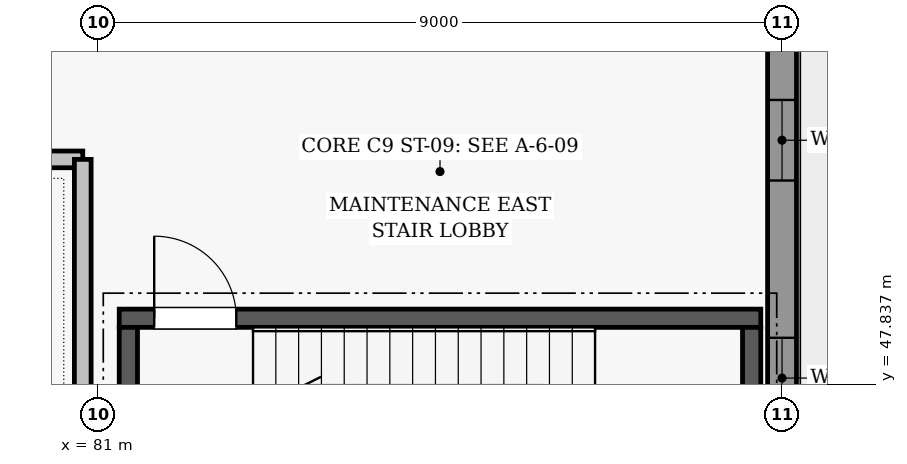
"""IFC4 building model, lengths in metres.
Left out: names, types, materials, properties, quantities, classifications, styles, units other than length and angle.
Written with IfcOpenShell. Run it as: python <this file> out.ifc"""

import sys

from ifc_helpers import new_model, si_unit, direction, frame, frame_2d, origin, place, context, subcontext, project, spatial, rectangle, extrude, element, fill, save


model = new_model("IFC4")
c1 = context("Model", 3, precision=1e-05, world=origin(), true_north=direction((0.0, 1.0)))
c2 = subcontext(c1, "Body", "Model", "MODEL_VIEW")
j1 = project(units=[si_unit("LENGTHUNIT", "METRE"), si_unit("PLANEANGLEUNIT", "RADIAN")], contexts=[c1])
p1 = place(None, origin())
s1 = spatial("IfcSite", under=j1, at=p1, CompositionType="ELEMENT")
p2 = place(p1, origin())
s2 = spatial("IfcBuilding", under=s1, at=p2, CompositionType="ELEMENT")
p3 = place(p2, origin())
s3 = spatial("IfcBuildingStorey", under=s2, at=p3, CompositionType="ELEMENT", Elevation=0.0)
p4 = place(p3, frame((90.0, 45.323, 0.0), z_axis=(0.0, 0.0, 1.0), x_axis=(0.0, 1.0, 0.0)))
e1 = element("IfcWall", 1, at=p4, inside=s3, PredefinedType="SOLIDWALL", context=c2, shape_type="SweptSolid", body=[
    extrude(rectangle(XDim=8.329, YDim=0.38, at=frame_2d((4.165, 0.0))), origin(), (0.0, 0.0, 1.0), 4.012),
])
p5 = place(p4, frame((2.07, 0.0, 0.85)))
e2 = element("IfcOpeningElement", 2, at=p5, cuts=e1, PredefinedType="OPENING", context=c2, shape_type="SweptSolid", body=[
    extrude(rectangle(XDim=1.06, YDim=1.35, at=frame_2d((0.53, 0.675))), frame((0.0, 0.2, 0.0), z_axis=(0.0, -1.0, 0.0), x_axis=(1.0, 0.0, 0.0)), (0.0, 0.0, 1.0), 0.4),
])
p6 = place(p4, frame((5.199, 0.0, 0.85)))
e3 = element("IfcOpeningElement", 3, at=p6, cuts=e1, PredefinedType="OPENING", context=c2, shape_type="SweptSolid", body=[
    extrude(rectangle(XDim=1.06, YDim=1.35, at=frame_2d((0.53, 0.675))), frame((0.0, 0.2, 0.0), z_axis=(0.0, -1.0, 0.0), x_axis=(1.0, 0.0, 0.0)), (0.0, 0.0, 1.0), 0.4),
])
p7 = place(p3, frame((81.28, 48.71, 0.0), z_axis=(0.0, 0.0, 1.0), x_axis=(1.0, 0.0, 0.0)))
e4 = element("IfcWall", 4, at=p7, inside=s3, PredefinedType="SHEAR", context=c2, shape_type="SweptSolid", body=[
    extrude(rectangle(XDim=8.44, YDim=0.24, at=frame_2d((4.22, 0.0))), origin(), (0.0, 0.0, 1.0), 4.55),
])
p8 = place(p7, frame((0.46, 0.0, 0.0)))
e5 = element("IfcOpeningElement", 5, at=p8, cuts=e4, PredefinedType="OPENING", context=c2, shape_type="SweptSolid", body=[
    extrude(rectangle(XDim=1.08, YDim=2.08, at=frame_2d((0.54, 1.04))), frame((0.0, 0.13, 0.0), z_axis=(0.0, -1.0, 0.0), x_axis=(1.0, 0.0, 0.0)), (0.0, 0.0, 1.0), 0.26),
])
for number, where, z_axis, x_axis in (
    (6, (81.4, 45.4, 0.0), (0.0, 0.0, 1.0), (0.0, 1.0, 0.0)),
    (7, (89.6, 45.4, 0.0), (0.0, 0.0, 1.0), (0.0, 1.0, 0.0)),
):
    element("IfcWall", number, at=place(p3, frame(where, z_axis=z_axis, x_axis=x_axis)), inside=s3, PredefinedType="SHEAR", context=c2, shape_type="SweptSolid", body=[
        extrude(rectangle(XDim=3.19, YDim=0.24, at=frame_2d((1.595, 0.0))), origin(), (0.0, 0.0, 1.0), 4.55),
    ])
p9 = place(p3, frame((63.4, 50.8, 0.0), z_axis=(0.0, 0.0, 1.0), x_axis=(1.0, 0.0, 0.0)))
e8 = element("IfcWall", 8, at=p9, inside=s3, PredefinedType="SOLIDWALL", context=c2, shape_type="SweptSolid", body=[
    extrude(rectangle(XDim=17.4, YDim=0.22, at=frame_2d((8.7, 0.0))), origin(), (0.0, 0.0, 1.0), 3.865),
])
p10 = place(p9, frame((12.34, 0.0, 0.0)))
e9 = element("IfcOpeningElement", 9, at=p10, cuts=e8, PredefinedType="OPENING", context=c2, shape_type="SweptSolid", body=[
    extrude(rectangle(XDim=1.52, YDim=2.16, at=frame_2d((0.76, 1.08))), frame((0.0, 0.12, 0.0), z_axis=(0.0, -1.0, 0.0), x_axis=(1.0, 0.0, 0.0)), (0.0, 0.0, 1.0), 0.24),
])
p11 = place(p3, frame((80.8, 45.4, 0.0), z_axis=(0.0, 0.0, 1.0), x_axis=(0.0, 1.0, 0.0)))
e10 = element("IfcWall", 10, at=p11, inside=s3, PredefinedType="SOLIDWALL", context=c2, shape_type="SweptSolid", body=[
    extrude(rectangle(XDim=5.4, YDim=0.22, at=frame_2d((2.7, 0.0))), origin(), (0.0, 0.0, 1.0), 3.865),
])
p12 = place(p5, origin())
e11 = element("IfcWindow", 11, at=p12, inside=s3, PartitioningType="SINGLE_PANEL", PredefinedType="WINDOW", context=c2, shape_type="SweptSolid", body=[
    extrude(rectangle(XDim=1.06, YDim=1.35, at=frame_2d((0.53, 0.675))), frame((0.0, 0.03, 0.0), z_axis=(0.0, -1.0, 0.0), x_axis=(1.0, 0.0, 0.0)), (0.0, 0.0, 1.0), 0.06),
])
fill(e2, e11)
p13 = place(p6, origin())
e12 = element("IfcWindow", 12, at=p13, inside=s3, PartitioningType="SINGLE_PANEL", PredefinedType="WINDOW", context=c2, shape_type="SweptSolid", body=[
    extrude(rectangle(XDim=1.06, YDim=1.35, at=frame_2d((0.53, 0.675))), frame((0.0, 0.03, 0.0), z_axis=(0.0, -1.0, 0.0), x_axis=(1.0, 0.0, 0.0)), (0.0, 0.0, 1.0), 0.06),
])
fill(e3, e12)
p14 = place(p8, origin())
e13 = element("IfcDoor", 13, at=p14, inside=s3, OperationType="SINGLE_SWING_LEFT", PredefinedType="DOOR", context=c2, shape_type="SweptSolid", body=[
    extrude(rectangle(XDim=1.08, YDim=2.08, at=frame_2d((0.54, 1.04))), frame((0.0, 0.025, 0.0), z_axis=(0.0, -1.0, 0.0), x_axis=(1.0, 0.0, 0.0)), (0.0, 0.0, 1.0), 0.05),
])
fill(e5, e13)
save(model, sys.argv[1])
